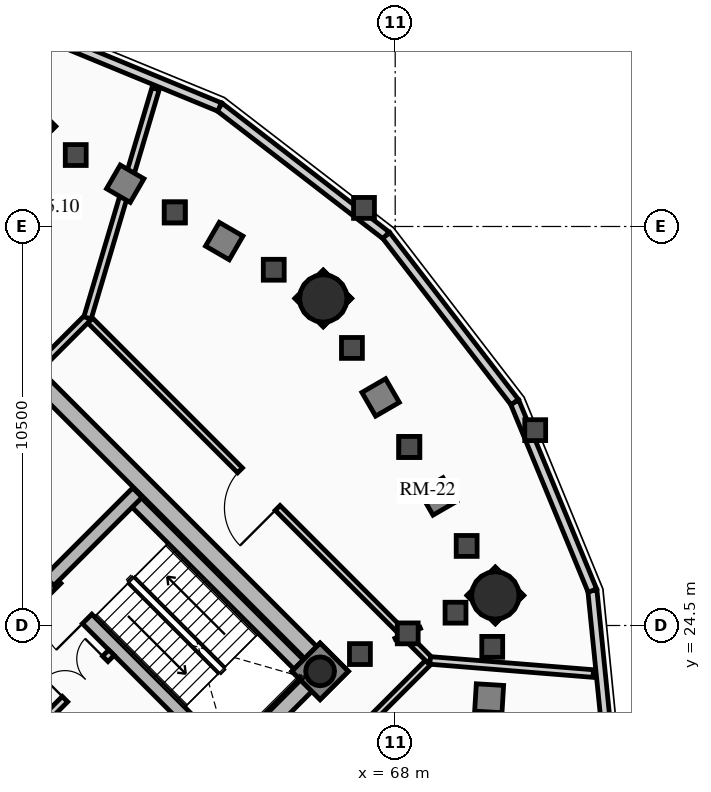
"""IFC4 building model, lengths in metres.
Left out: names, types, materials, properties, quantities, classifications, styles, units other than length and angle.
Written with IfcOpenShell. Run it as: python <this file> out.ifc"""

import sys

from ifc_helpers import new_model, si_unit, direction, frame, frame_2d, origin, origin_2d, place, context, subcontext, project, spatial, rectangle, circle, hollow_circle, extrude, source, transform, mapped, element, fill, save


model = new_model("IFC4")
c1 = context("Model", 3, precision=1e-05, world=origin(), true_north=direction((0.0, 1.0)))
c2 = subcontext(c1, "Body", "Model", "MODEL_VIEW")
j1 = project(units=[si_unit("LENGTHUNIT", "METRE"), si_unit("PLANEANGLEUNIT", "RADIAN")], contexts=[c1])
p1 = place(None, origin())
s1 = spatial("IfcSite", under=j1, at=p1, CompositionType="ELEMENT")
p2 = place(p1, origin())
s2 = spatial("IfcBuilding", under=s1, at=p2, CompositionType="ELEMENT")
p3 = place(p2, frame((0.0, 0.0, 147.1)))
s3 = spatial("IfcBuildingStorey", under=s2, at=p3, CompositionType="ELEMENT", Elevation=147.1)
p4 = place(p3, frame((66.303, 23.263, 0.0), z_axis=(0.0, 0.0, 1.0), x_axis=(-0.707106781187, 0.707106781187, 0.0)))
e1 = element("IfcWall", 1, at=p4, inside=s3, PredefinedType="SHEAR", context=c2, shape_type="SweptSolid", body=[
    extrude(rectangle(XDim=14.2, YDim=0.45, at=frame_2d((7.1, 0.0))), origin(), (0.0, 0.0, 1.0), 4.5),
])
p5 = place(p3, frame((58.578, 15.856, 0.0), z_axis=(0.0, 0.0, 1.0), x_axis=(0.707106781187, 0.707106781187, 0.0)))
e2 = element("IfcWall", 2, at=p5, inside=s3, PredefinedType="SHEAR", context=c2, shape_type="SweptSolid", body=[
    extrude(rectangle(XDim=10.7, YDim=0.45, at=frame_2d((5.35, 0.0))), origin(), (0.0, 0.0, 1.0), 4.5),
])
m1 = source(origin(), c2, "Body", "SweptSolid", [
    extrude(rectangle(XDim=1.5, YDim=2.02, at=frame_2d((0.75, 1.01))), frame((0.0, 0.235, 0.0), z_axis=(0.0, -1.0, 0.0), x_axis=(1.0, 0.0, 0.0)), (0.0, 0.0, 1.0), 0.47),
])
p6 = place(p5, frame((5.45, 0.0, 0.0)))
e3 = element("IfcOpeningElement", 3, at=p6, cuts=e2, PredefinedType="OPENING", context=c2, shape_type="MappedRepresentation", body=[
    mapped(m1, transform((0.0, 0.0, 0.0), x_axis=(1.0, 0.0, 0.0), y_axis=(0.0, 1.0, 0.0), z_axis=(0.0, 0.0, 1.0), scale=1.0)),
])
p7 = place(p3, frame((61.078, 18.355, 0.0), z_axis=(0.0, 0.0, 1.0), x_axis=(-0.707106781187, 0.707106781187, 0.0)))
e4 = element("IfcWall", 4, at=p7, inside=s3, PredefinedType="SHEAR", context=c2, shape_type="SweptSolid", body=[
    extrude(rectangle(XDim=13.75, YDim=0.35, at=frame_2d((6.875, 0.0))), origin(), (0.0, 0.0, 1.0), 4.5),
])
m2 = source(origin(), c2, "Body", "SweptSolid", [
    extrude(rectangle(XDim=1.1, YDim=2.015, at=frame_2d((0.55, 1.007))), frame((0.0, 0.185, 0.0), z_axis=(0.0, -1.0, 0.0), x_axis=(1.0, 0.0, 0.0)), (0.0, 0.0, 1.0), 0.37),
])
p8 = place(p7, frame((4.875, 0.0, 0.0)))
e5 = element("IfcOpeningElement", 5, at=p8, cuts=e4, PredefinedType="OPENING", context=c2, shape_type="MappedRepresentation", body=[
    mapped(m2, transform((0.0, 0.0, 0.0), x_axis=(1.0, 0.0, 0.0), y_axis=(0.0, 1.0, 0.0), z_axis=(0.0, 0.0, 1.0), scale=1.0)),
])
m3 = source(origin(), c2, "Body", "SweptSolid", [
    extrude(rectangle(XDim=1.15, YDim=2.02, at=frame_2d((0.575, 1.01))), frame((0.0, 0.185, 0.0), z_axis=(0.0, -1.0, 0.0), x_axis=(1.0, 0.0, 0.0)), (0.0, 0.0, 1.0), 0.37),
])
p9 = place(p7, frame((7.295, 0.0, 0.0)))
e6 = element("IfcOpeningElement", 6, at=p9, cuts=e4, PredefinedType="OPENING", context=c2, shape_type="MappedRepresentation", body=[
    mapped(m3, transform((0.0, 0.0, 0.0), x_axis=(1.0, 0.0, 0.0), y_axis=(0.0, 1.0, 0.0), z_axis=(0.0, 0.0, 1.0), scale=1.0)),
])
p10 = place(p3, frame((63.645, 20.922, 0.0), z_axis=(0.0, 0.0, 1.0), x_axis=(-0.70711946392, 0.707094098226, 0.0)))
e7 = element("IfcWall", 7, at=p10, inside=s3, PredefinedType="SHEAR", context=c2, shape_type="SweptSolid", body=[
    extrude(rectangle(XDim=9.625, YDim=0.35, at=frame_2d((4.812, 0.0))), origin(), (0.0, 0.0, 1.0), 4.5),
])
p11 = place(p10, frame((5.305, 0.0, 0.0)))
e8 = element("IfcOpeningElement", 8, at=p11, cuts=e7, PredefinedType="OPENING", context=c2, shape_type="MappedRepresentation", body=[
    mapped(m3, transform((0.0, 0.0, 0.0), x_axis=(1.0, 0.0, 0.0), y_axis=(0.0, 1.0, 0.0), z_axis=(0.0, 0.0, 1.0), scale=1.0)),
])
p12 = place(p3, frame((65.83, 23.107, 0.0), z_axis=(0.0, 0.0, 1.0), x_axis=(-0.707088616009, 0.707124945897, 0.0)))
e9 = element("IfcWall", 9, at=p12, inside=s3, PredefinedType="SHEAR", context=c2, shape_type="SweptSolid", body=[
    extrude(rectangle(XDim=6.72, YDim=0.35, at=frame_2d((3.36, 0.0))), origin(), (0.0, 0.0, 1.0), 4.5),
])
p13 = place(p3, frame((58.893, 25.674, 0.0), z_axis=(0.0, 0.0, 1.0), x_axis=(0.707106781187, 0.707106781187, 0.0)))
e10 = element("IfcWall", 10, at=p13, inside=s3, PredefinedType="SHEAR", context=c2, shape_type="SweptSolid", body=[
    extrude(rectangle(XDim=3.285, YDim=0.35, at=frame_2d((1.643, 0.0))), origin(), (0.0, 0.0, 1.0), 4.5),
])
p14 = place(p3, frame((66.024, 23.294, 0.0), z_axis=(0.0, 0.0, 1.0), x_axis=(0.707106781187, 0.707106781187, 0.0)))
e11 = element("IfcColumn", 11, at=p14, inside=s3, PredefinedType="COLUMN", context=c2, shape_type="SweptSolid", body=[
    extrude(hollow_circle(Radius=0.38, WallThickness=0.032, at=origin_2d()), origin(), (0.0, 0.0, 1.0), 4.5),
])
for number, where, z_axis, x_axis in (
    (12, (66.107, 33.107, 0.0), (0.0, 0.0, 1.0), (1.0, 0.0, 0.0)),
    (13, (70.635, 25.291, 0.0), (0.0, 0.0, 1.0), (1.0, 0.0, 0.0)),
):
    element("IfcColumn", number, at=place(p3, frame(where, z_axis=z_axis, x_axis=x_axis)), inside=s3, PredefinedType="USERDEFINED", context=c2, shape_type="SweptSolid", body=[
        extrude(circle(Radius=0.625, at=origin_2d()), origin(), (0.0, 0.0, 1.0), 4.5),
    ])
p15 = place(p3, frame((63.378, 38.144, 0.0), z_axis=(0.0, 0.0, 1.0), x_axis=(0.791982658323, -0.610543584779, 0.0)))
e14 = element("IfcWall", 14, at=p15, inside=s3, PredefinedType="SOLIDWALL", context=c2, shape_type="SweptSolid", body=[
    extrude(rectangle(XDim=5.537, YDim=0.24, at=frame_2d((2.769, 0.0))), origin(), (0.0, 0.0, 1.0), 3.636),
])
p16 = place(p3, frame((58.418, 40.189, 0.0), z_axis=(0.0, 0.0, 1.0), x_axis=(0.924528197738, -0.38111364655, 0.0)))
e15 = element("IfcWall", 15, at=p16, inside=s3, PredefinedType="SOLIDWALL", context=c2, shape_type="SweptSolid", body=[
    extrude(rectangle(XDim=5.366, YDim=0.24, at=frame_2d((2.683, 0.0))), origin(), (0.0, 0.0, 1.0), 3.636),
])
p17 = place(p3, frame((73.189, 25.418, 0.0), z_axis=(0.0, 0.0, 1.0), x_axis=(0.100279889424, -0.994959267396, 0.0)))
e16 = element("IfcWall", 16, at=p17, inside=s3, PredefinedType="SOLIDWALL", context=c2, shape_type="SweptSolid", body=[
    extrude(rectangle(XDim=5.076, YDim=0.24, at=frame_2d((2.538, 0.0))), origin(), (0.0, 0.0, 1.0), 3.636),
])
p18 = place(p3, frame((71.144, 30.378, 0.0), z_axis=(0.0, 0.0, 1.0), x_axis=(0.38111364655, -0.924528197738, 0.0)))
e17 = element("IfcWall", 17, at=p18, inside=s3, PredefinedType="SOLIDWALL", context=c2, shape_type="SweptSolid", body=[
    extrude(rectangle(XDim=5.366, YDim=0.24, at=frame_2d((2.683, 0.0))), origin(), (0.0, 0.0, 1.0), 3.636),
])
p19 = place(p3, frame((67.764, 34.764, 0.0), z_axis=(0.0, 0.0, 1.0), x_axis=(0.610543584779, -0.791982658323, 0.0)))
e18 = element("IfcWall", 18, at=p19, inside=s3, PredefinedType="SOLIDWALL", context=c2, shape_type="SweptSolid", body=[
    extrude(rectangle(XDim=5.537, YDim=0.24, at=frame_2d((2.769, 0.0))), origin(), (0.0, 0.0, 1.0), 3.636),
])
p20 = place(p3, frame((58.214, 21.467, 0.0), z_axis=(0.0, 0.0, 1.0), x_axis=(0.707106781187, 0.707106781187, 0.0)))
e19 = element("IfcWall", 19, at=p20, inside=s3, PredefinedType="PARTITIONING", context=c2, shape_type="SweptSolid", body=[
    extrude(rectangle(XDim=3.28, YDim=0.2, at=frame_2d((1.64, 0.0))), origin(), (0.0, 0.0, 1.0), 4.265),
])
m4 = source(origin(), c2, "Body", "SweptSolid", [
    extrude(rectangle(XDim=1.5, YDim=2.02, at=frame_2d((0.75, 1.01))), frame((0.0, 0.11, 0.0), z_axis=(0.0, -1.0, 0.0), x_axis=(1.0, 0.0, 0.0)), (0.0, 0.0, 1.0), 0.22),
])
p21 = place(p20, frame((1.55, 0.0, 0.0)))
e20 = element("IfcOpeningElement", 20, at=p21, cuts=e19, PredefinedType="OPENING", context=c2, shape_type="MappedRepresentation", body=[
    mapped(m4, transform((0.0, 0.0, 0.0), x_axis=(1.0, 0.0, 0.0), y_axis=(0.0, 1.0, 0.0), z_axis=(0.0, 0.0, 1.0), scale=1.0)),
])
p22 = place(p3, frame((58.419, 13.08, 0.0), z_axis=(0.0, 0.0, 1.0), x_axis=(0.707106781187, 0.707106781187, 0.0)))
e21 = element("IfcWall", 21, at=p22, inside=s3, PredefinedType="PARTITIONING", context=c2, shape_type="SweptSolid", body=[
    extrude(rectangle(XDim=14.85, YDim=0.18, at=frame_2d((7.425, 0.0))), origin(), (0.0, 0.0, 1.0), 3.556),
])
m5 = source(origin(), c2, "Body", "SweptSolid", [
    extrude(rectangle(XDim=1.4, YDim=2.02, at=frame_2d((0.7, 1.01))), frame((0.0, 0.1, 0.0), z_axis=(0.0, -1.0, 0.0), x_axis=(1.0, 0.0, 0.0)), (0.0, 0.0, 1.0), 0.2),
])
p23 = place(p22, frame((6.725, 0.0, 0.0)))
e22 = element("IfcOpeningElement", 22, at=p23, cuts=e21, PredefinedType="OPENING", context=c2, shape_type="MappedRepresentation", body=[
    mapped(m5, transform((0.0, 0.0, 0.0), x_axis=(1.0, 0.0, 0.0), y_axis=(0.0, 1.0, 0.0), z_axis=(0.0, 0.0, 1.0), scale=1.0)),
])
p24 = place(p3, frame((68.92, 23.581, 0.0), z_axis=(0.0, 0.0, 1.0), x_axis=(-0.707106781187, 0.707106781187, 0.0)))
e23 = element("IfcWall", 23, at=p24, inside=s3, PredefinedType="PARTITIONING", context=c2, shape_type="SweptSolid", body=[
    extrude(rectangle(XDim=12.75, YDim=0.18, at=frame_2d((6.375, 0.0))), origin(), (0.0, 0.0, 1.0), 3.556),
])
p25 = place(p24, frame((5.675, 0.0, 0.0)))
e24 = element("IfcOpeningElement", 24, at=p25, cuts=e23, PredefinedType="OPENING", context=c2, shape_type="MappedRepresentation", body=[
    mapped(m5, transform((0.0, 0.0, 0.0), x_axis=(1.0, 0.0, 0.0), y_axis=(0.0, 1.0, 0.0), z_axis=(0.0, 0.0, 1.0), scale=1.0)),
])
p26 = place(p3, frame((58.596, 31.288, 0.0), z_axis=(0.0, 0.0, 1.0), x_axis=(0.707106781187, 0.707106781187, 0.0)))
e25 = element("IfcWall", 25, at=p26, inside=s3, PredefinedType="PARTITIONING", context=c2, shape_type="SweptSolid", body=[
    extrude(rectangle(XDim=1.85, YDim=0.2, at=frame_2d((0.925, 0.0))), origin(), (0.0, 0.0, 1.0), 4.265),
])
p27 = place(p3, frame((59.904, 32.596, 0.0), z_axis=(0.0, 0.0, 1.0), x_axis=(0.284628951368, 0.958637762684, 0.0)))
e26 = element("IfcWall", 26, at=p27, inside=s3, PredefinedType="PARTITIONING", context=c2, shape_type="SweptSolid", body=[
    extrude(rectangle(XDim=6.288, YDim=0.2, at=frame_2d((3.144, 0.0))), origin(), (0.0, 0.0, 1.0), 3.556),
])
p28 = place(p3, frame((68.92, 23.581, 0.0), z_axis=(0.0, 0.0, 1.0), x_axis=(0.996775304462, -0.080243332526, 0.0)))
e27 = element("IfcWall", 27, at=p28, inside=s3, PredefinedType="PARTITIONING", context=c2, shape_type="SweptSolid", body=[
    extrude(rectangle(XDim=4.305, YDim=0.2, at=frame_2d((2.153, 0.0))), origin(), (0.0, 0.0, 1.0), 3.636),
])
m6 = source(origin(), c2, "Body", "SweptSolid", [
    extrude(rectangle(XDim=1.15, YDim=2.02, at=frame_2d((0.575, 1.01))), frame((0.0, 0.025, 0.0), z_axis=(0.0, -1.0, 0.0), x_axis=(1.0, 0.0, 0.0)), (0.0, 0.0, 1.0), 0.05),
])
p29 = place(p11, origin())
e28 = element("IfcDoor", 28, at=p29, inside=s3, OperationType="SINGLE_SWING_LEFT", PredefinedType="DOOR", context=c2, shape_type="MappedRepresentation", body=[
    mapped(m6, transform((0.0, 0.0, 0.0), x_axis=(1.0, 0.0, 0.0), y_axis=(0.0, 1.0, 0.0), z_axis=(0.0, 0.0, 1.0), scale=1.0)),
])
fill(e8, e28)
m7 = source(origin(), c2, "Body", "SweptSolid", [
    extrude(rectangle(XDim=1.5, YDim=2.02, at=frame_2d((0.75, 1.01))), frame((0.0, 0.025, 0.0), z_axis=(0.0, -1.0, 0.0), x_axis=(1.0, 0.0, 0.0)), (0.0, 0.0, 1.0), 0.05),
])
p30 = place(p21, origin())
e29 = element("IfcDoor", 29, at=p30, inside=s3, OperationType="DOUBLE_DOOR_SINGLE_SWING", PredefinedType="DOOR", context=c2, shape_type="MappedRepresentation", body=[
    mapped(m7, transform((0.0, 0.0, 0.0), x_axis=(1.0, 0.0, 0.0), y_axis=(0.0, 1.0, 0.0), z_axis=(0.0, 0.0, 1.0), scale=1.0)),
])
fill(e20, e29)
m8 = source(origin(), c2, "Body", "SweptSolid", [
    extrude(rectangle(XDim=1.4, YDim=2.02, at=frame_2d((0.7, 1.01))), frame((0.0, 0.025, 0.0), z_axis=(0.0, -1.0, 0.0), x_axis=(1.0, 0.0, 0.0)), (0.0, 0.0, 1.0), 0.05),
])
p31 = place(p25, origin())
e30 = element("IfcDoor", 30, at=p31, inside=s3, OperationType="SINGLE_SWING_LEFT", PredefinedType="DOOR", context=c2, shape_type="MappedRepresentation", body=[
    mapped(m8, transform((0.0, 0.0, 0.0), x_axis=(1.0, 0.0, 0.0), y_axis=(0.0, 1.0, 0.0), z_axis=(0.0, 0.0, 1.0), scale=1.0)),
])
fill(e24, e30)
save(model, sys.argv[1])
